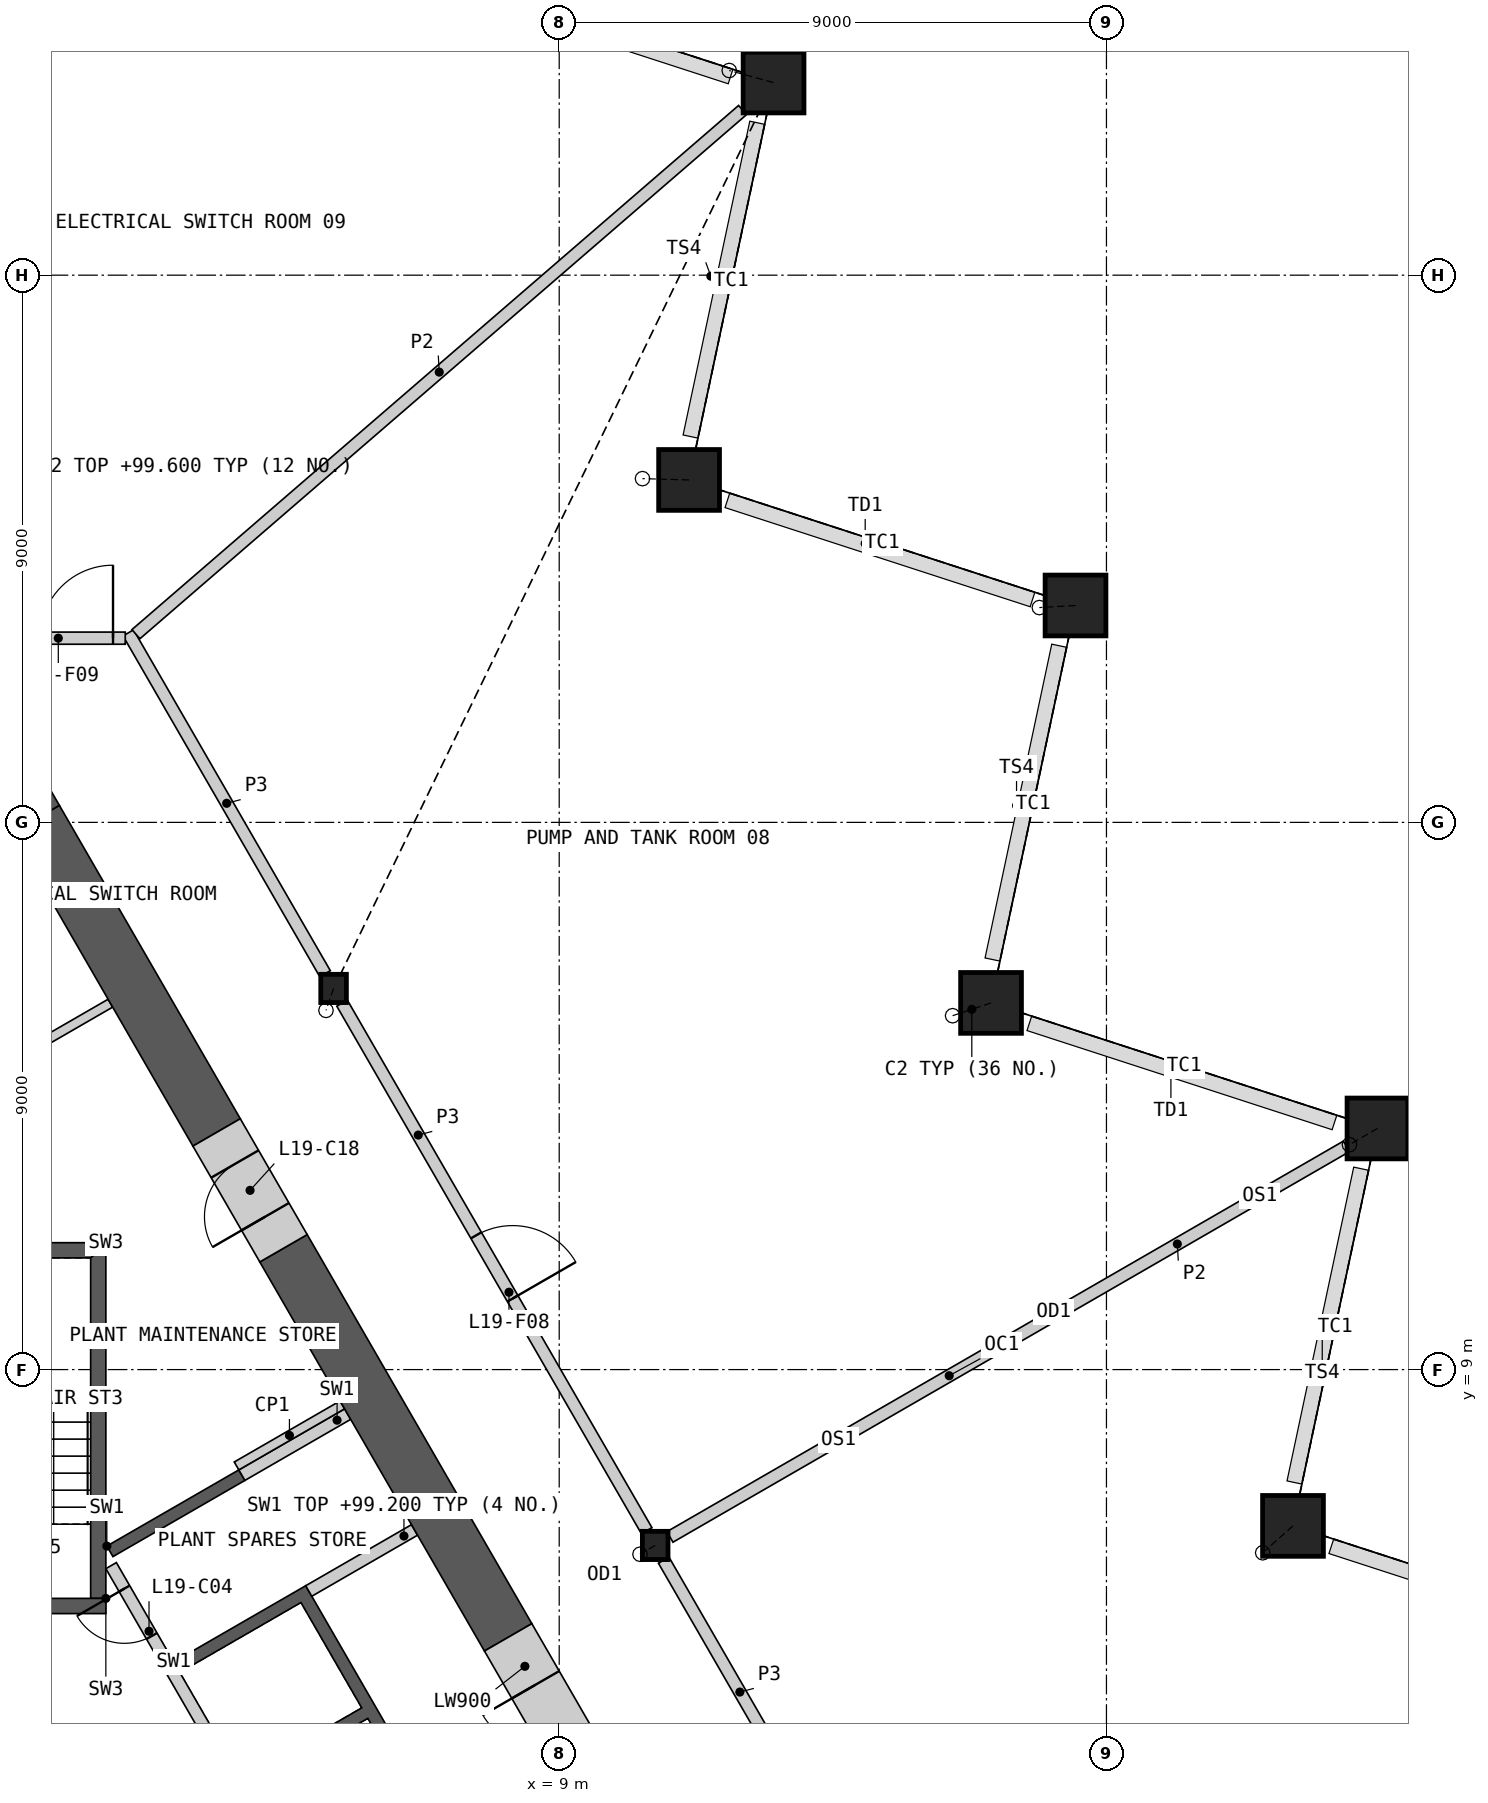
"""IFC4 building model, lengths in metres.
Left out: names, types, materials, properties, quantities, classifications, styles, units other than length and angle.
Written with IfcOpenShell. Run it as: python <this file> out.ifc"""

import sys

from ifc_helpers import new_model, si_unit, direction, frame, frame_2d, origin, origin_2d, place, context, subcontext, project, spatial, polyline, rectangle, hollow_rectangle, i_section, outline, extrude, element, fill, save


model = new_model("IFC4")
c1 = context("Model", 3, precision=1e-05, world=origin(), true_north=direction((0.0, 1.0)))
c2 = subcontext(c1, "Body", "Model", "MODEL_VIEW")
j1 = project(units=[si_unit("LENGTHUNIT", "METRE"), si_unit("PLANEANGLEUNIT", "RADIAN")], contexts=[c1])
p1 = place(None, origin())
s1 = spatial("IfcSite", under=j1, at=p1, CompositionType="ELEMENT")
p2 = place(p1, origin())
s2 = spatial("IfcBuilding", under=s1, at=p2, CompositionType="ELEMENT")
p3 = place(p2, frame((0.0, 0.0, 94.6)))
s3 = spatial("IfcBuildingStorey", under=s2, at=p3, CompositionType="ELEMENT", Elevation=94.6)
p4 = place(p3, frame((21.068, 6.429, 0.0), z_axis=(-0.098784861039, -0.08770120931, 0.991236626197), x_axis=(0.663908879859, -0.747813478914, 0.0)))
e1 = element("IfcColumn", 1, at=p4, inside=s3, PredefinedType="COLUMN", context=c2, shape_type="SweptSolid", body=[
    extrude(hollow_rectangle(XDim=1.0, YDim=1.0, WallThickness=0.07, at=origin_2d()), frame((0.0, 0.0, 0.067)), (0.0, 0.0, 1.0), 4.911),
])
p5 = place(p3, frame((22.457, 12.966, 0.0), z_axis=(-0.091669600312, -0.05292365696, 0.994382105085), x_axis=(0.499987164874, -0.866032814021, 0.0)))
e2 = element("IfcColumn", 2, at=p5, inside=s3, PredefinedType="COLUMN", context=c2, shape_type="SweptSolid", body=[
    extrude(hollow_rectangle(XDim=1.0, YDim=1.0, WallThickness=0.07, at=origin_2d()), frame((0.0, 0.0, 0.053)), (0.0, 0.0, 1.0), 4.922),
])
p6 = place(p3, frame((16.102, 15.031, 0.0), z_axis=(-0.125356273922, -0.041720891166, 0.991234165991), x_axis=(0.315788119833, -0.948829733605, 0.0)))
e3 = element("IfcColumn", 3, at=p6, inside=s3, PredefinedType="COLUMN", context=c2, shape_type="SweptSolid", body=[
    extrude(hollow_rectangle(XDim=1.0, YDim=1.0, WallThickness=0.07, at=origin_2d()), frame((0.0, 0.0, 0.067)), (0.0, 0.0, 1.0), 4.911),
])
p7 = place(p3, frame((17.491, 21.567, 0.0), z_axis=(-0.118157805746, -0.006787892, 0.992971629738), x_axis=(0.057353120111, -0.998353955075, 0.0)))
e4 = element("IfcColumn", 4, at=p7, inside=s3, PredefinedType="COLUMN", context=c2, shape_type="SweptSolid", body=[
    extrude(hollow_rectangle(XDim=1.0, YDim=1.0, WallThickness=0.07, at=origin_2d()), frame((0.0, 0.0, 0.06)), (0.0, 0.0, 1.0), 4.916),
])
p8 = place(p3, frame((11.136, 23.632, 0.0), z_axis=(-0.151453734779, 0.004247268534, 0.988455222522), x_axis=(-0.02803231916, -0.999607017324, 0.0)))
e5 = element("IfcColumn", 5, at=p8, inside=s3, PredefinedType="COLUMN", context=c2, shape_type="SweptSolid", body=[
    extrude(hollow_rectangle(XDim=1.0, YDim=1.0, WallThickness=0.07, at=origin_2d()), frame((0.0, 0.0, 0.077)), (0.0, 0.0, 1.0), 4.905),
])
p9 = place(p3, frame((12.525, 30.169, 0.0), z_axis=(-0.144117980097, 0.039059110854, 0.988789357584), x_axis=(-0.261584923065, -0.965180463968, 0.0)))
e6 = element("IfcColumn", 6, at=p9, inside=s3, PredefinedType="COLUMN", context=c2, shape_type="SweptSolid", body=[
    extrude(hollow_rectangle(XDim=1.0, YDim=1.0, WallThickness=0.07, at=origin_2d()), frame((0.0, 0.0, 0.075)), (0.0, 0.0, 1.0), 4.906),
])
p10 = place(p3, frame((10.578, 6.107, 0.0), z_axis=(-0.049916888914, -0.028809454442, 0.998337778277), x_axis=(0.499868889286, -0.866101087359, 0.0)))
e7 = element("IfcColumn", 7, at=p10, inside=s3, PredefinedType="COLUMN", context=c2, shape_type="SweptSolid", body=[
    extrude(i_section(OverallWidth=0.421, OverallDepth=0.465, WebThickness=0.045, FlangeThickness=0.072, at=origin_2d()), frame((0.0, 0.0, 0.013)), (0.0, 0.0, 1.0), 4.981),
])
p11 = place(p3, frame((5.289, 15.269, 0.0), z_axis=(-0.024927402258, -0.071958399488, 0.997096090334), x_axis=(0.944910039342, -0.327330135415, 0.0)))
e8 = element("IfcColumn", 8, at=p11, inside=s3, PredefinedType="COLUMN", context=c2, shape_type="SweptSolid", body=[
    extrude(i_section(OverallWidth=0.421, OverallDepth=0.465, WebThickness=0.045, FlangeThickness=0.072, at=origin_2d()), frame((0.0, 0.0, 0.018)), (0.0, 0.0, 1.0), 4.979),
])
p12 = place(p3, origin())
e9 = element("IfcWall", 9, at=p12, inside=s3, PredefinedType="SHEAR", context=c2, shape_type="SweptSolid", body=[
    extrude(outline(polyline([(1.561, 6.097), (3.731, 7.35), (3.831, 7.177), (1.66, 5.924), (1.561, 6.097)])), origin(), (0.0, 0.0, 1.0), 4.6),
])
p13 = place(p3, origin())
e10 = element("IfcWall", 10, at=p13, inside=s3, PredefinedType="SHEAR", context=c2, shape_type="SweptSolid", body=[
    extrude(outline(polyline([(2.66, 4.192), (4.831, 5.445), (8.231, -0.444), (6.061, -1.697), (5.96, -1.524), (7.952, -0.374), (6.952, 1.358), (4.96, 0.208), (4.861, 0.381), (6.852, 1.531), (5.852, 3.263), (3.861, 2.113), (3.76, 2.287), (5.752, 3.437), (4.752, 5.169), (2.76, 4.019), (2.66, 4.192)])), origin(), (0.0, 0.0, 1.0), 4.6),
])
p14 = place(p3, frame((5.817, -1.476, 0.0), z_axis=(0.0, 0.0, 1.0), x_axis=(-0.500002616675, 0.866023893041, 0.0)))
e11 = element("IfcWall", 11, at=p14, inside=s3, PredefinedType="SOLIDWALL", context=c2, shape_type="SweptSolid", body=[
    extrude(rectangle(XDim=8.373, YDim=0.2, at=frame_2d((4.187, 0.0))), origin(), (0.0, 0.0, 1.0), 4.6),
])
p15 = place(p14, frame((7.037, 0.0, 0.0)))
e12 = element("IfcOpeningElement", 12, at=p15, cuts=e11, PredefinedType="OPENING", context=c2, shape_type="SweptSolid", body=[
    extrude(rectangle(XDim=0.9, YDim=2.1, at=frame_2d((0.45, 1.05))), frame((0.0, 0.11, 0.0), z_axis=(0.0, -1.0, 0.0), x_axis=(1.0, 0.0, 0.0)), (0.0, 0.0, 1.0), 0.22),
])
p16 = place(p3, frame((4.881, 5.358, 0.0), z_axis=(0.0, 0.0, 1.0), x_axis=(0.866035824272, 0.499981950752, 0.0)))
e13 = element("IfcWall", 13, at=p16, inside=s3, PredefinedType="SHEAR", context=c2, shape_type="SweptSolid", body=[
    extrude(rectangle(XDim=2.009, YDim=0.2, at=frame_2d((1.004, 0.0))), origin(), (0.0, 0.0, 1.0), 4.6),
])
p17 = place(p3, frame((3.781, 7.263, 0.0), z_axis=(0.0, 0.0, 1.0), x_axis=(0.865983199114, 0.50007309351, 0.0)))
e14 = element("IfcWall", 14, at=p17, inside=s3, PredefinedType="SHEAR", context=c2, shape_type="SweptSolid", body=[
    extrude(rectangle(XDim=2.009, YDim=0.2, at=frame_2d((1.004, 0.0))), origin(), (0.0, 0.0, 1.0), 4.6),
])
p18 = place(p3, origin())
e15 = element("IfcWall", 15, at=p18, inside=s3, PredefinedType="SHEAR", context=c2, shape_type="SweptSolid", body=[
    extrude(outline(polyline([(1.544, 5.237), (1.544, 11.087), (1.294, 10.837), (1.294, 5.237), (1.544, 5.237)])), origin(), (0.0, 0.0, 1.0), 4.6),
])
p19 = place(p3, origin())
e16 = element("IfcWall", 16, at=p19, inside=s3, PredefinedType="SHEAR", context=c2, shape_type="SweptSolid", body=[
    extrude(outline(polyline([(1.544, 11.087), (-1.544, 11.087), (-1.294, 10.837), (1.294, 10.837), (1.544, 11.087)])), origin(), (0.0, 0.0, 1.0), 4.6),
])
p20 = place(p3, frame((1.544, 5.112, 0.0), z_axis=(0.0, 0.0, 1.0), x_axis=(-1.0, 0.0, 0.0)))
e17 = element("IfcWall", 17, at=p20, inside=s3, PredefinedType="SHEAR", context=c2, shape_type="SweptSolid", body=[
    extrude(rectangle(XDim=3.088, YDim=0.25, at=frame_2d((1.544, 0.0))), origin(), (0.0, 0.0, 1.0), 4.6),
])
p21 = place(p20, frame((0.994, 0.0, 0.0)))
e18 = element("IfcOpeningElement", 18, at=p21, cuts=e17, PredefinedType="OPENING", context=c2, shape_type="SweptSolid", body=[
    extrude(rectangle(XDim=1.1, YDim=2.1, at=frame_2d((0.55, 1.05))), frame((0.0, 0.135, 0.0), z_axis=(0.0, -1.0, 0.0), x_axis=(1.0, 0.0, 0.0)), (0.0, 0.0, 1.0), 0.27),
])
p22 = place(p3, frame((3.693, 7.415, 0.0), z_axis=(0.0, 0.0, 1.0), x_axis=(0.866035824272, 0.499981950752, 0.0)))
e19 = element("IfcWall", 19, at=p22, inside=s3, PredefinedType="PARTITIONING", context=c2, shape_type="SweptSolid", body=[
    extrude(rectangle(XDim=2.009, YDim=0.15, at=frame_2d((1.004, 0.0))), origin(), (0.0, 0.0, 1.0), 4.6),
])
p23 = place(p3, frame((1.619, 15.026, 0.0), z_axis=(0.0, 0.0, 1.0), x_axis=(-0.866015917575, -0.500016430238, 0.0)))
e20 = element("IfcWall", 20, at=p23, inside=s3, PredefinedType="PARTITIONING", context=c2, shape_type="SweptSolid", body=[
    extrude(rectangle(XDim=5.607, YDim=0.15, at=frame_2d((2.804, 0.0))), origin(), (0.0, 0.0, 1.0), 4.6),
])
p24 = place(p3, frame((8.16, 4.596, 0.0), z_axis=(0.0, 0.0, 1.0), x_axis=(-0.500012259336, 0.866018325738, 0.0)))
e21 = element("IfcWall", 21, at=p24, inside=s3, PredefinedType="SHEAR", context=c2, shape_type="SweptSolid", body=[
    extrude(rectangle(XDim=7.389, YDim=0.9, at=frame_2d((3.695, 0.0))), origin(), (0.0, 0.0, 1.0), 4.6),
])
p25 = place(p3, frame((3.365, 12.9, 0.0), z_axis=(0.0, 0.0, 1.0), x_axis=(-0.499981657175, 0.86603599376, 0.0)))
e22 = element("IfcWall", 22, at=p25, inside=s3, PredefinedType="SHEAR", context=c2, shape_type="SweptSolid", body=[
    extrude(rectangle(XDim=5.952, YDim=0.9, at=frame_2d((2.976, 0.0))), origin(), (0.0, 0.0, 1.0), 4.6),
])
p26 = place(p3, origin())
e23 = element("IfcWall", 23, at=p26, inside=s3, PredefinedType="SHEAR", context=c2, shape_type="SweptSolid", body=[
    extrude(outline(polyline([(-0.779, 18.28), (0.0, 19.63), (0.779, 18.28), (0.0, 17.83), (-0.779, 18.28)])), origin(), (0.0, 0.0, 1.0), 4.6),
])
p27 = place(p3, frame((9.26, 2.691, 0.0), z_axis=(0.0, 0.0, 1.0), x_axis=(-0.499946605688, 0.86605622881, 0.0)))
e24 = element("IfcWall", 24, at=p27, inside=s3, PredefinedType="SHEAR", context=c2, shape_type="SweptSolid", body=[
    extrude(rectangle(XDim=2.2, YDim=0.9, at=frame_2d((1.1, 0.0))), origin(), (0.0, 0.0, 1.0), 4.6),
])
p28 = place(p27, frame((0.3, 0.0, 0.0)))
e25 = element("IfcOpeningElement", 25, at=p28, cuts=e24, PredefinedType="OPENING", context=c2, shape_type="SweptSolid", body=[
    extrude(rectangle(XDim=1.0, YDim=2.1, at=frame_2d((0.5, 1.05))), frame((0.0, 0.46, 0.0), z_axis=(0.0, -1.0, 0.0), x_axis=(1.0, 0.0, 0.0)), (0.0, 0.0, 1.0), 0.92),
])
p29 = place(p3, frame((4.466, 10.995, 0.0), z_axis=(0.0, 0.0, 1.0), x_axis=(-0.500077893725, 0.86598042715, 0.0)))
e26 = element("IfcWall", 26, at=p29, inside=s3, PredefinedType="SHEAR", context=c2, shape_type="SweptSolid", body=[
    extrude(rectangle(XDim=2.2, YDim=0.9, at=frame_2d((1.1, 0.0))), origin(), (0.0, 0.0, 1.0), 4.6),
])
p30 = place(p29, frame((0.6, 0.0, 0.0)))
e27 = element("IfcOpeningElement", 27, at=p30, cuts=e26, PredefinedType="OPENING", context=c2, shape_type="SweptSolid", body=[
    extrude(rectangle(XDim=1.0, YDim=2.1, at=frame_2d((0.5, 1.05))), frame((0.0, 0.46, 0.0), z_axis=(0.0, -1.0, 0.0), x_axis=(1.0, 0.0, 0.0)), (0.0, 0.0, 1.0), 0.92),
])
p31 = place(p3, frame((5.429, 15.026, 0.0), z_axis=(0.0, 0.0, 1.0), x_axis=(0.50001002959, -0.86601961312, 0.0)))
e28 = element("IfcWall", 28, at=p31, inside=s3, PredefinedType="PARTITIONING", context=c2, shape_type="SweptSolid", body=[
    extrude(rectangle(XDim=10.019, YDim=0.2, at=frame_2d((5.009, 0.0))), origin(), (0.0, 0.0, 1.0), 4.6),
])
p32 = place(p31, frame((4.409, 0.0, 0.0)))
e29 = element("IfcOpeningElement", 29, at=p32, cuts=e28, PredefinedType="OPENING", context=c2, shape_type="SweptSolid", body=[
    extrude(rectangle(XDim=1.2, YDim=2.1, at=frame_2d((0.6, 1.05))), frame((0.0, 0.11, 0.0), z_axis=(0.0, -1.0, 0.0), x_axis=(1.0, 0.0, 0.0)), (0.0, 0.0, 1.0), 0.22),
])
p33 = place(p3, frame((10.719, 5.865, 0.0), z_axis=(0.0, 0.0, 1.0), x_axis=(0.49999175339, -0.866030164915, 0.0)))
e30 = element("IfcWall", 30, at=p33, inside=s3, PredefinedType="PARTITIONING", context=c2, shape_type="SweptSolid", body=[
    extrude(rectangle(XDim=10.019, YDim=0.2, at=frame_2d((5.009, 0.0))), origin(), (0.0, 0.0, 1.0), 4.6),
])
p34 = place(p33, frame((4.409, 0.0, 0.0)))
e31 = element("IfcOpeningElement", 31, at=p34, cuts=e30, PredefinedType="OPENING", context=c2, shape_type="SweptSolid", body=[
    extrude(rectangle(XDim=1.2, YDim=2.1, at=frame_2d((0.6, 1.05))), frame((0.0, 0.11, 0.0), z_axis=(0.0, -1.0, 0.0), x_axis=(1.0, 0.0, 0.0)), (0.0, 0.0, 1.0), 0.22),
])
p35 = place(p3, frame((1.913, 21.116, 0.0), z_axis=(0.0, 0.0, 1.0), x_axis=(0.500001069878, -0.866024786089, 0.0)))
e32 = element("IfcWall", 32, at=p35, inside=s3, PredefinedType="PARTITIONING", context=c2, shape_type="SweptSolid", body=[
    extrude(rectangle(XDim=6.473, YDim=0.2, at=frame_2d((3.236, 0.0))), origin(), (0.0, 0.0, 1.0), 4.6),
])
p36 = place(p3, frame((-1.863, 21.03, 0.0), z_axis=(0.0, 0.0, 1.0), x_axis=(1.0, 0.0, 0.0)))
e33 = element("IfcWall", 33, at=p36, inside=s3, PredefinedType="PARTITIONING", context=c2, shape_type="SweptSolid", body=[
    extrude(rectangle(XDim=3.726, YDim=0.2, at=frame_2d((1.863, 0.0))), origin(), (0.0, 0.0, 1.0), 4.6),
])
p37 = place(p36, frame((2.325, 0.0, 0.0)))
e34 = element("IfcOpeningElement", 34, at=p37, cuts=e33, PredefinedType="OPENING", context=c2, shape_type="SweptSolid", body=[
    extrude(rectangle(XDim=1.2, YDim=2.1, at=frame_2d((0.6, 1.05))), frame((0.0, 0.11, 0.0), z_axis=(0.0, -1.0, 0.0), x_axis=(1.0, 0.0, 0.0)), (0.0, 0.0, 1.0), 0.22),
])
p38 = place(p3, frame((2.039, 21.095, 0.0), z_axis=(0.0, 0.0, 1.0), x_axis=(0.756656024203, 0.653813169826, 0.0)))
e35 = element("IfcWall", 35, at=p38, inside=s3, PredefinedType="PARTITIONING", context=c2, shape_type="SweptSolid", body=[
    extrude(rectangle(XDim=13.185, YDim=0.2, at=frame_2d((6.592, 0.0))), origin(), (0.0, 0.0, 1.0), 4.6),
])
p39 = place(p3, frame((10.821, 6.247, 0.0), z_axis=(0.0, 0.0, 1.0), x_axis=(0.866026729935, 0.499997703033, 0.0)))
e36 = element("IfcWall", 36, at=p39, inside=s3, PredefinedType="PARTITIONING", context=c2, shape_type="SweptSolid", body=[
    extrude(rectangle(XDim=12.848, YDim=0.2, at=frame_2d((6.424, 0.0))), origin(), (0.0, 0.0, 1.0), 4.6),
])
p40 = place(p15, origin())
e37 = element("IfcDoor", 37, at=p40, inside=s3, OperationType="SINGLE_SWING_RIGHT", PredefinedType="DOOR", context=c2, shape_type="SweptSolid", body=[
    extrude(rectangle(XDim=0.9, YDim=2.1, at=frame_2d((0.45, 1.05))), frame((0.0, 0.025, 0.0), z_axis=(0.0, -1.0, 0.0), x_axis=(1.0, 0.0, 0.0)), (0.0, 0.0, 1.0), 0.05),
])
fill(e12, e37)
p41 = place(p28, origin())
e38 = element("IfcDoor", 38, at=p41, inside=s3, OperationType="SINGLE_SWING_RIGHT", PredefinedType="DOOR", context=c2, shape_type="SweptSolid", body=[
    extrude(rectangle(XDim=1.0, YDim=2.1, at=frame_2d((0.5, 1.05))), frame((0.0, 0.205, 0.0), z_axis=(0.0, -1.0, 0.0), x_axis=(1.0, 0.0, 0.0)), (0.0, 0.0, 1.0), 0.05),
])
fill(e25, e38)
p42 = place(p30, origin())
e39 = element("IfcDoor", 39, at=p42, inside=s3, OperationType="SINGLE_SWING_LEFT", PredefinedType="DOOR", context=c2, shape_type="SweptSolid", body=[
    extrude(rectangle(XDim=1.0, YDim=2.1, at=frame_2d((0.5, 1.05))), frame((0.0, 0.205, 0.0), z_axis=(0.0, -1.0, 0.0), x_axis=(1.0, 0.0, 0.0)), (0.0, 0.0, 1.0), 0.05),
])
fill(e27, e39)
p43 = place(p32, origin())
e40 = element("IfcDoor", 40, at=p43, inside=s3, OperationType="SINGLE_SWING_RIGHT", PredefinedType="DOOR", context=c2, shape_type="SweptSolid", body=[
    extrude(rectangle(XDim=1.2, YDim=2.1, at=frame_2d((0.6, 1.05))), frame((0.0, 0.025, 0.0), z_axis=(0.0, -1.0, 0.0), x_axis=(1.0, 0.0, 0.0)), (0.0, 0.0, 1.0), 0.05),
])
fill(e29, e40)
p44 = place(p37, origin())
e41 = element("IfcDoor", 41, at=p44, inside=s3, OperationType="SINGLE_SWING_RIGHT", PredefinedType="DOOR", context=c2, shape_type="SweptSolid", body=[
    extrude(rectangle(XDim=1.2, YDim=2.1, at=frame_2d((0.6, 1.05))), frame((0.0, 0.025, 0.0), z_axis=(0.0, -1.0, 0.0), x_axis=(1.0, 0.0, 0.0)), (0.0, 0.0, 1.0), 0.05),
])
fill(e34, e41)
save(model, sys.argv[1])
